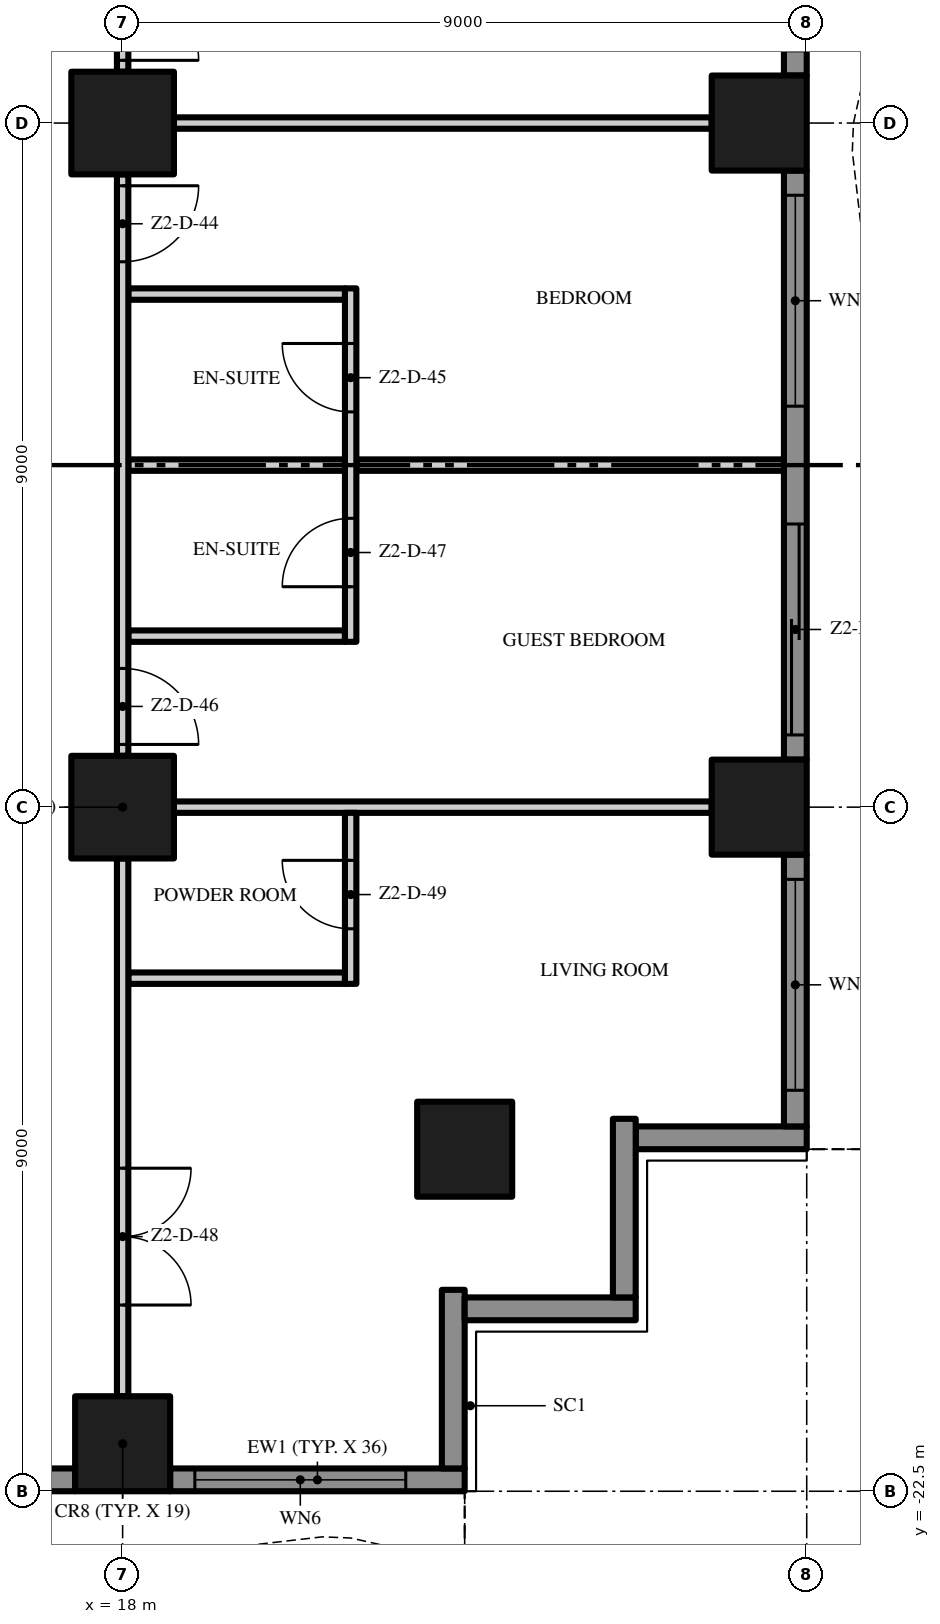
"""IFC4 building model, lengths in metres.
Left out: names, types, materials, properties, quantities, classifications, styles, units other than length and angle.
Written with IfcOpenShell. Run it as: python <this file> out.ifc"""

import sys

from ifc_helpers import new_model, si_unit, direction, frame, frame_2d, origin, origin_2d, place, context, subcontext, project, spatial, polyline, rectangle, outline, extrude, element, fill, save


model = new_model("IFC4")
c1 = context("Model", 3, precision=1e-05, world=origin(), true_north=direction((0.0, 1.0)))
c2 = subcontext(c1, "Body", "Model", "MODEL_VIEW")
j1 = project(units=[si_unit("LENGTHUNIT", "METRE"), si_unit("PLANEANGLEUNIT", "RADIAN")], contexts=[c1])
p1 = place(None, origin())
s1 = spatial("IfcSite", under=j1, at=p1, CompositionType="ELEMENT")
p2 = place(p1, origin())
s2 = spatial("IfcBuilding", under=s1, at=p2, CompositionType="ELEMENT")
p3 = place(p2, frame((0.0, 0.0, 103.6)))
s3 = spatial("IfcBuildingStorey", under=s2, at=p3, CompositionType="ELEMENT", Elevation=103.6)
p4 = place(p3, frame((18.0, -13.5, 0.0), z_axis=(0.0, 0.0, 1.0), x_axis=(1.0, 0.0, 0.0)))
e1 = element("IfcColumn", 1, at=p4, inside=s3, PredefinedType="COLUMN", context=c2, shape_type="SweptSolid", body=[
    extrude(rectangle(XDim=1.35, YDim=1.35, at=origin_2d()), origin(), (0.0, 0.0, 1.0), 3.5),
])
p5 = place(p3, frame((18.0, -21.875, 0.0), z_axis=(0.0, 0.0, 1.0), x_axis=(1.0, 0.0, 0.0)))
e2 = element("IfcColumn", 2, at=p5, inside=s3, PredefinedType="COLUMN", context=c2, shape_type="SweptSolid", body=[
    extrude(rectangle(XDim=1.25, YDim=1.25, at=origin_2d()), origin(), (0.0, 0.0, 1.0), 3.5),
])
p6 = place(p3, frame((18.0, -4.5, 0.0), z_axis=(0.0, 0.0, 1.0), x_axis=(1.0, 0.0, 0.0)))
e3 = element("IfcColumn", 3, at=p6, inside=s3, PredefinedType="COLUMN", context=c2, shape_type="SweptSolid", body=[
    extrude(rectangle(XDim=1.35, YDim=1.35, at=origin_2d()), origin(), (0.0, 0.0, 1.0), 3.5),
])
for number, where, z_axis, x_axis in (
    (4, (26.375, -13.5, 0.0), (0.0, 0.0, 1.0), (1.0, 0.0, 0.0)),
    (5, (22.5, -18.0, 0.0), (0.0, 0.0, 1.0), (1.0, 0.0, 0.0)),
    (6, (26.375, -4.5, 0.0), (0.0, 0.0, 1.0), (1.0, 0.0, 0.0)),
):
    element("IfcColumn", number, at=place(p3, frame(where, z_axis=z_axis, x_axis=x_axis)), inside=s3, PredefinedType="COLUMN", context=c2, shape_type="SweptSolid", body=[
        extrude(rectangle(XDim=1.25, YDim=1.25, at=origin_2d()), origin(), (0.0, 0.0, 1.0), 3.5),
    ])
p7 = place(p3, frame((17.375, -22.35, 0.0), z_axis=(0.0, 0.0, 1.0), x_axis=(-1.0, 0.0, 0.0)))
e7 = element("IfcWall", 7, at=p7, inside=s3, PredefinedType="SOLIDWALL", context=c2, shape_type="SweptSolid", body=[
    extrude(rectangle(XDim=7.75, YDim=0.3, at=frame_2d((3.875, 0.0))), origin(), (0.0, 0.0, 1.0), 3.5),
])
p8 = place(p7, frame((4.65, 0.0, 0.0)))
e8 = element("IfcOpeningElement", 8, at=p8, cuts=e7, PredefinedType="OPENING", context=c2, shape_type="SweptSolid", body=[
    extrude(rectangle(XDim=2.775, YDim=2.4, at=frame_2d((1.387, 1.2))), frame((0.0, 0.16, 0.0), z_axis=(0.0, -1.0, 0.0), x_axis=(1.0, 0.0, 0.0)), (0.0, 0.0, 1.0), 0.32),
])
p9 = place(p7, frame((0.325, 0.0, 0.0)))
e9 = element("IfcOpeningElement", 9, at=p9, cuts=e7, PredefinedType="OPENING", context=c2, shape_type="SweptSolid", body=[
    extrude(rectangle(XDim=2.775, YDim=2.4, at=frame_2d((1.387, 1.2))), frame((0.0, 0.16, 0.0), z_axis=(0.0, -1.0, 0.0), x_axis=(1.0, 0.0, 0.0)), (0.0, 0.0, 1.0), 0.32),
])
p10 = place(p3, frame((22.5, -22.35, 0.0), z_axis=(0.0, 0.0, 1.0), x_axis=(-1.0, 0.0, 0.0)))
e10 = element("IfcWall", 10, at=p10, inside=s3, PredefinedType="SOLIDWALL", context=c2, shape_type="SweptSolid", body=[
    extrude(rectangle(XDim=3.875, YDim=0.3, at=frame_2d((1.938, 0.0))), origin(), (0.0, 0.0, 1.0), 3.5),
])
p11 = place(p10, frame((0.775, 0.0, 0.45)))
e11 = element("IfcOpeningElement", 11, at=p11, cuts=e10, PredefinedType="OPENING", context=c2, shape_type="SweptSolid", body=[
    extrude(rectangle(XDim=2.775, YDim=2.65, at=frame_2d((1.387, 1.325))), frame((0.0, 0.16, 0.0), z_axis=(0.0, -1.0, 0.0), x_axis=(1.0, 0.0, 0.0)), (0.0, 0.0, 1.0), 0.32),
])
p12 = place(p3, frame((22.35, -19.85, 0.0), z_axis=(0.0, 0.0, 1.0), x_axis=(0.0, -1.0, 0.0)))
e12 = element("IfcWall", 12, at=p12, inside=s3, PredefinedType="SOLIDWALL", context=c2, shape_type="SweptSolid", body=[
    extrude(rectangle(XDim=2.35, YDim=0.3, at=frame_2d((1.175, 0.0))), origin(), (0.0, 0.0, 1.0), 3.5),
])
p13 = place(p3, frame((24.75, -20.1, 0.0), z_axis=(0.0, 0.0, 1.0), x_axis=(-1.0, 0.0, 0.0)))
e13 = element("IfcWall", 13, at=p13, inside=s3, PredefinedType="SOLIDWALL", context=c2, shape_type="SweptSolid", body=[
    extrude(rectangle(XDim=2.25, YDim=0.3, at=frame_2d((1.125, 0.0))), origin(), (0.0, 0.0, 1.0), 3.5),
])
p14 = place(p3, frame((24.6, -17.6, 0.0), z_axis=(0.0, 0.0, 1.0), x_axis=(0.0, -1.0, 0.0)))
e14 = element("IfcWall", 14, at=p14, inside=s3, PredefinedType="SOLIDWALL", context=c2, shape_type="SweptSolid", body=[
    extrude(rectangle(XDim=2.35, YDim=0.3, at=frame_2d((1.175, 0.0))), origin(), (0.0, 0.0, 1.0), 3.5),
])
p15 = place(p3, frame((27.0, -17.85, 0.0), z_axis=(0.0, 0.0, 1.0), x_axis=(-1.0, 0.0, 0.0)))
e15 = element("IfcWall", 15, at=p15, inside=s3, PredefinedType="SOLIDWALL", context=c2, shape_type="SweptSolid", body=[
    extrude(rectangle(XDim=2.25, YDim=0.3, at=frame_2d((1.125, 0.0))), origin(), (0.0, 0.0, 1.0), 3.5),
])
p16 = place(p3, frame((26.85, -14.125, 0.0), z_axis=(0.0, 0.0, 1.0), x_axis=(0.0, -1.0, 0.0)))
e16 = element("IfcWall", 16, at=p16, inside=s3, PredefinedType="SOLIDWALL", context=c2, shape_type="SweptSolid", body=[
    extrude(rectangle(XDim=3.575, YDim=0.3, at=frame_2d((1.788, 0.0))), origin(), (0.0, 0.0, 1.0), 3.5),
])
p17 = place(p16, frame((0.325, 0.0, 0.45)))
e17 = element("IfcOpeningElement", 17, at=p17, cuts=e16, PredefinedType="OPENING", context=c2, shape_type="SweptSolid", body=[
    extrude(rectangle(XDim=2.775, YDim=2.65, at=frame_2d((1.387, 1.325))), frame((0.0, 0.16, 0.0), z_axis=(0.0, -1.0, 0.0), x_axis=(1.0, 0.0, 0.0)), (0.0, 0.0, 1.0), 0.32),
])
p18 = place(p3, frame((26.85, -5.125, 0.0), z_axis=(0.0, 0.0, 1.0), x_axis=(0.0, -1.0, 0.0)))
e18 = element("IfcWall", 18, at=p18, inside=s3, PredefinedType="SOLIDWALL", context=c2, shape_type="SweptSolid", body=[
    extrude(rectangle(XDim=7.75, YDim=0.3, at=frame_2d((3.875, 0.0))), origin(), (0.0, 0.0, 1.0), 3.5),
])
p19 = place(p18, frame((4.65, 0.0, 0.0)))
e19 = element("IfcOpeningElement", 19, at=p19, cuts=e18, PredefinedType="OPENING", context=c2, shape_type="SweptSolid", body=[
    extrude(rectangle(XDim=2.775, YDim=2.4, at=frame_2d((1.387, 1.2))), frame((0.0, 0.16, 0.0), z_axis=(0.0, -1.0, 0.0), x_axis=(1.0, 0.0, 0.0)), (0.0, 0.0, 1.0), 0.32),
])
p20 = place(p18, frame((0.325, 0.0, 0.45)))
e20 = element("IfcOpeningElement", 20, at=p20, cuts=e18, PredefinedType="OPENING", context=c2, shape_type="SweptSolid", body=[
    extrude(rectangle(XDim=2.775, YDim=2.65, at=frame_2d((1.387, 1.325))), frame((0.0, 0.16, 0.0), z_axis=(0.0, -1.0, 0.0), x_axis=(1.0, 0.0, 0.0)), (0.0, 0.0, 1.0), 0.32),
])
p21 = place(p3, frame((26.85, 3.875, 0.0), z_axis=(0.0, 0.0, 1.0), x_axis=(0.0, -1.0, 0.0)))
e21 = element("IfcWall", 21, at=p21, inside=s3, PredefinedType="SOLIDWALL", context=c2, shape_type="SweptSolid", body=[
    extrude(rectangle(XDim=7.75, YDim=0.3, at=frame_2d((3.875, 0.0))), origin(), (0.0, 0.0, 1.0), 3.5),
])
p22 = place(p21, frame((4.65, 0.0, 0.45)))
e22 = element("IfcOpeningElement", 22, at=p22, cuts=e21, PredefinedType="OPENING", context=c2, shape_type="SweptSolid", body=[
    extrude(rectangle(XDim=2.775, YDim=2.65, at=frame_2d((1.387, 1.325))), frame((0.0, 0.16, 0.0), z_axis=(0.0, -1.0, 0.0), x_axis=(1.0, 0.0, 0.0)), (0.0, 0.0, 1.0), 0.32),
])
p23 = place(p21, frame((0.325, 0.0, 0.0)))
e23 = element("IfcOpeningElement", 23, at=p23, cuts=e21, PredefinedType="OPENING", context=c2, shape_type="SweptSolid", body=[
    extrude(rectangle(XDim=2.775, YDim=2.4, at=frame_2d((1.387, 1.2))), frame((0.0, 0.16, 0.0), z_axis=(0.0, -1.0, 0.0), x_axis=(1.0, 0.0, 0.0)), (0.0, 0.0, 1.0), 0.32),
])
p24 = place(p3, origin())
e24 = element("IfcWall", 24, at=p24, inside=s3, PredefinedType="USERDEFINED", context=c2, shape_type="SweptSolid", body=[
    extrude(outline(polyline([(-22.5, -23.451), (-21.0, -24.112), (-19.5, -24.845), (-18.0, -25.369), (-16.875, -25.5), (-16.5, -25.485), (-15.0, -25.149), (-13.5, -24.488), (-12.0, -23.755), (-10.5, -23.231), (-9.375, -23.1), (-9.0, -23.115), (-7.5, -23.451), (-6.0, -24.112), (-4.5, -24.845), (-3.0, -25.369), (-1.875, -25.5), (-1.5, -25.485), (0.0, -25.149), (1.5, -24.488), (3.0, -23.755), (4.5, -23.231), (5.625, -23.1), (6.0, -23.115), (7.5, -23.451), (9.0, -24.112), (10.5, -24.845), (12.0, -25.369), (13.125, -25.5), (13.5, -25.485), (15.0, -25.149), (16.5, -24.488), (18.0, -23.755), (19.5, -23.231), (20.625, -23.1), (21.0, -23.115), (22.5, -23.451), (22.555, -23.208), (21.033, -22.866), (20.615, -22.849), (19.444, -22.986), (17.904, -23.524), (16.395, -24.261), (14.921, -24.91), (13.467, -25.236), (13.135, -25.249), (12.056, -25.124), (10.596, -24.614), (9.105, -23.885), (7.579, -23.213), (6.033, -22.866), (5.615, -22.849), (4.444, -22.986), (2.904, -23.524), (1.395, -24.261), (-0.079, -24.91), (-1.533, -25.236), (-1.865, -25.249), (-2.944, -25.124), (-4.404, -24.614), (-5.895, -23.885), (-7.421, -23.213), (-8.967, -22.866), (-9.385, -22.849), (-10.556, -22.986), (-12.096, -23.524), (-13.605, -24.261), (-15.079, -24.91), (-16.533, -25.236), (-16.865, -25.249), (-17.944, -25.124), (-19.404, -24.614), (-20.895, -23.885), (-22.399, -23.223), (-22.5, -23.451)])), origin(), (0.0, 0.0, 1.0), 0.9),
])
p25 = place(p3, origin())
e25 = element("IfcWall", 25, at=p25, inside=s3, PredefinedType="USERDEFINED", context=c2, shape_type="SweptSolid", body=[
    extrude(outline(polyline([(27.951, -18.0), (28.612, -16.5), (29.345, -15.0), (29.869, -13.5), (30.0, -12.375), (29.985, -12.0), (29.649, -10.5), (28.988, -9.0), (28.255, -7.5), (27.731, -6.0), (27.6, -4.875), (27.615, -4.5), (27.951, -3.0), (28.612, -1.5), (29.345, 0.0), (29.869, 1.5), (30.0, 2.625), (29.985, 3.0), (29.649, 4.5), (28.988, 6.0), (28.255, 7.5), (27.731, 9.0), (27.6, 10.125), (27.615, 10.5), (27.951, 12.0), (28.612, 13.5), (29.345, 15.0), (29.869, 16.5), (30.0, 17.625), (29.985, 18.0), (29.735, 17.99), (29.749, 17.635), (29.624, 16.556), (29.114, 15.096), (28.385, 13.605), (27.713, 12.079), (27.366, 10.533), (27.349, 10.115), (27.486, 8.944), (28.024, 7.404), (28.761, 5.895), (29.41, 4.421), (29.736, 2.967), (29.749, 2.635), (29.624, 1.556), (29.114, 0.096), (28.385, -1.395), (27.713, -2.921), (27.366, -4.467), (27.349, -4.885), (27.486, -6.056), (28.024, -7.596), (28.761, -9.105), (29.41, -10.579), (29.736, -12.033), (29.749, -12.365), (29.624, -13.444), (29.114, -14.904), (28.385, -16.395), (27.723, -17.899), (27.951, -18.0)])), origin(), (0.0, 0.0, 1.0), 0.9),
])
p26 = place(p3, frame((18.075, -15.75, 0.0), z_axis=(0.0, 0.0, 1.0), x_axis=(1.0, 0.0, 0.0)))
e26 = element("IfcWall", 26, at=p26, inside=s3, PredefinedType="PARTITIONING", context=c2, shape_type="SweptSolid", body=[
    extrude(rectangle(XDim=2.85, YDim=0.15, at=frame_2d((1.425, 0.0))), origin(), (0.0, 0.0, 1.0), 3.5),
])
p27 = place(p3, frame((18.675, -13.5, 0.0), z_axis=(0.0, 0.0, 1.0), x_axis=(1.0, 0.0, 0.0)))
e27 = element("IfcWall", 27, at=p27, inside=s3, PredefinedType="PARTITIONING", context=c2, shape_type="SweptSolid", body=[
    extrude(rectangle(XDim=7.075, YDim=0.15, at=frame_2d((3.538, 0.0))), origin(), (0.0, 0.0, 1.0), 3.5),
])
for number, where, z_axis, x_axis in (
    (28, (18.075, -11.25, 0.0), (0.0, 0.0, 1.0), (1.0, 0.0, 0.0)),
    (29, (18.075, -9.0, 0.0), (0.0, 0.0, 1.0), (1.0, 0.0, 0.0)),
):
    element("IfcWall", number, at=place(p3, frame(where, z_axis=z_axis, x_axis=x_axis)), inside=s3, PredefinedType="PARTITIONING", context=c2, shape_type="SweptSolid", body=[
        extrude(rectangle(XDim=2.85, YDim=0.15, at=frame_2d((1.425, 0.0))), origin(), (0.0, 0.0, 1.0), 3.5),
    ])
p28 = place(p3, frame((21.075, -9.0, 0.0), z_axis=(0.0, 0.0, 1.0), x_axis=(1.0, 0.0, 0.0)))
e30 = element("IfcWall", 30, at=p28, inside=s3, PredefinedType="PARTITIONING", context=c2, shape_type="SweptSolid", body=[
    extrude(rectangle(XDim=5.625, YDim=0.15, at=frame_2d((2.812, 0.0))), origin(), (0.0, 0.0, 1.0), 3.5),
])
p29 = place(p3, frame((18.075, -6.75, 0.0), z_axis=(0.0, 0.0, 1.0), x_axis=(1.0, 0.0, 0.0)))
e31 = element("IfcWall", 31, at=p29, inside=s3, PredefinedType="PARTITIONING", context=c2, shape_type="SweptSolid", body=[
    extrude(rectangle(XDim=2.85, YDim=0.15, at=frame_2d((1.425, 0.0))), origin(), (0.0, 0.0, 1.0), 3.5),
])
p30 = place(p3, frame((18.675, -4.5, 0.0), z_axis=(0.0, 0.0, 1.0), x_axis=(1.0, 0.0, 0.0)))
e32 = element("IfcWall", 32, at=p30, inside=s3, PredefinedType="PARTITIONING", context=c2, shape_type="SweptSolid", body=[
    extrude(rectangle(XDim=7.075, YDim=0.15, at=frame_2d((3.538, 0.0))), origin(), (0.0, 0.0, 1.0), 3.5),
])
p31 = place(p3, frame((18.0, -14.175, 0.0), z_axis=(0.0, 0.0, 1.0), x_axis=(0.0, -1.0, 0.0)))
e33 = element("IfcWall", 33, at=p31, inside=s3, PredefinedType="PARTITIONING", context=c2, shape_type="SweptSolid", body=[
    extrude(rectangle(XDim=7.075, YDim=0.15, at=frame_2d((3.538, 0.0))), origin(), (0.0, 0.0, 1.0), 3.5),
])
p32 = place(p31, frame((4.075, 0.0, 0.0)))
e34 = element("IfcOpeningElement", 34, at=p32, cuts=e33, PredefinedType="OPENING", context=c2, shape_type="SweptSolid", body=[
    extrude(rectangle(XDim=1.8, YDim=2.4, at=frame_2d((0.9, 1.2))), frame((0.0, 0.085, 0.0), z_axis=(0.0, -1.0, 0.0), x_axis=(1.0, 0.0, 0.0)), (0.0, 0.0, 1.0), 0.17),
])
p33 = place(p3, frame((18.0, -5.175, 0.0), z_axis=(0.0, 0.0, 1.0), x_axis=(0.0, -1.0, 0.0)))
e35 = element("IfcWall", 35, at=p33, inside=s3, PredefinedType="PARTITIONING", context=c2, shape_type="SweptSolid", body=[
    extrude(rectangle(XDim=7.65, YDim=0.15, at=frame_2d((3.825, 0.0))), origin(), (0.0, 0.0, 1.0), 3.5),
])
p34 = place(p33, frame((0.15, 0.0, 0.0)))
e36 = element("IfcOpeningElement", 36, at=p34, cuts=e35, PredefinedType="OPENING", context=c2, shape_type="SweptSolid", body=[
    extrude(rectangle(XDim=1.0, YDim=2.4, at=frame_2d((0.5, 1.2))), frame((0.0, 0.085, 0.0), z_axis=(0.0, -1.0, 0.0), x_axis=(1.0, 0.0, 0.0)), (0.0, 0.0, 1.0), 0.17),
])
p35 = place(p33, frame((6.5, 0.0, 0.0)))
e37 = element("IfcOpeningElement", 37, at=p35, cuts=e35, PredefinedType="OPENING", context=c2, shape_type="SweptSolid", body=[
    extrude(rectangle(XDim=1.0, YDim=2.4, at=frame_2d((0.5, 1.2))), frame((0.0, 0.085, 0.0), z_axis=(0.0, -1.0, 0.0), x_axis=(1.0, 0.0, 0.0)), (0.0, 0.0, 1.0), 0.17),
])
p36 = place(p3, frame((18.0, -0.1, 0.0), z_axis=(0.0, 0.0, 1.0), x_axis=(0.0, -1.0, 0.0)))
e38 = element("IfcWall", 38, at=p36, inside=s3, PredefinedType="PARTITIONING", context=c2, shape_type="SweptSolid", body=[
    extrude(rectangle(XDim=3.725, YDim=0.15, at=frame_2d((1.863, 0.0))), origin(), (0.0, 0.0, 1.0), 3.5),
])
p37 = place(p36, frame((2.575, 0.0, 0.0)))
e39 = element("IfcOpeningElement", 39, at=p37, cuts=e38, PredefinedType="OPENING", context=c2, shape_type="SweptSolid", body=[
    extrude(rectangle(XDim=1.0, YDim=2.4, at=frame_2d((0.5, 1.2))), frame((0.0, 0.085, 0.0), z_axis=(0.0, -1.0, 0.0), x_axis=(1.0, 0.0, 0.0)), (0.0, 0.0, 1.0), 0.17),
])
p38 = place(p3, frame((21.0, -15.825, 0.0), z_axis=(0.0, 0.0, 1.0), x_axis=(0.0, 1.0, 0.0)))
e40 = element("IfcWall", 40, at=p38, inside=s3, PredefinedType="PARTITIONING", context=c2, shape_type="SweptSolid", body=[
    extrude(rectangle(XDim=2.25, YDim=0.15, at=frame_2d((1.125, 0.0))), origin(), (0.0, 0.0, 1.0), 3.5),
])
p39 = place(p38, frame((0.725, 0.0, 0.0)))
e41 = element("IfcOpeningElement", 41, at=p39, cuts=e40, PredefinedType="OPENING", context=c2, shape_type="SweptSolid", body=[
    extrude(rectangle(XDim=0.9, YDim=2.1, at=frame_2d((0.45, 1.05))), frame((0.0, 0.085, 0.0), z_axis=(0.0, -1.0, 0.0), x_axis=(1.0, 0.0, 0.0)), (0.0, 0.0, 1.0), 0.17),
])
p40 = place(p3, frame((21.0, -11.325, 0.0), z_axis=(0.0, 0.0, 1.0), x_axis=(0.0, 1.0, 0.0)))
e42 = element("IfcWall", 42, at=p40, inside=s3, PredefinedType="PARTITIONING", context=c2, shape_type="SweptSolid", body=[
    extrude(rectangle(XDim=4.65, YDim=0.15, at=frame_2d((2.325, 0.0))), origin(), (0.0, 0.0, 1.0), 3.5),
])
p41 = place(p40, frame((3.025, 0.0, 0.0)))
e43 = element("IfcOpeningElement", 43, at=p41, cuts=e42, PredefinedType="OPENING", context=c2, shape_type="SweptSolid", body=[
    extrude(rectangle(XDim=0.9, YDim=2.1, at=frame_2d((0.45, 1.05))), frame((0.0, 0.085, 0.0), z_axis=(0.0, -1.0, 0.0), x_axis=(1.0, 0.0, 0.0)), (0.0, 0.0, 1.0), 0.17),
])
p42 = place(p40, frame((0.725, 0.0, 0.0)))
e44 = element("IfcOpeningElement", 44, at=p42, cuts=e42, PredefinedType="OPENING", context=c2, shape_type="SweptSolid", body=[
    extrude(rectangle(XDim=0.9, YDim=2.1, at=frame_2d((0.45, 1.05))), frame((0.0, 0.085, 0.0), z_axis=(0.0, -1.0, 0.0), x_axis=(1.0, 0.0, 0.0)), (0.0, 0.0, 1.0), 0.17),
])
p43 = place(p11, origin())
e45 = element("IfcWindow", 45, at=p43, inside=s3, PartitioningType="SINGLE_PANEL", PredefinedType="WINDOW", context=c2, shape_type="SweptSolid", body=[
    extrude(rectangle(XDim=2.775, YDim=2.65, at=frame_2d((1.387, 1.325))), frame((0.0, 0.03, 0.0), z_axis=(0.0, -1.0, 0.0), x_axis=(1.0, 0.0, 0.0)), (0.0, 0.0, 1.0), 0.06),
])
fill(e11, e45)
p44 = place(p17, origin())
e46 = element("IfcWindow", 46, at=p44, inside=s3, PartitioningType="SINGLE_PANEL", PredefinedType="WINDOW", context=c2, shape_type="SweptSolid", body=[
    extrude(rectangle(XDim=2.775, YDim=2.65, at=frame_2d((1.387, 1.325))), frame((0.0, 0.03, 0.0), z_axis=(0.0, -1.0, 0.0), x_axis=(1.0, 0.0, 0.0)), (0.0, 0.0, 1.0), 0.06),
])
fill(e17, e46)
p45 = place(p19, origin())
e47 = element("IfcDoor", 47, at=p45, inside=s3, OperationType="SINGLE_SWING_LEFT", PredefinedType="DOOR", context=c2, shape_type="SweptSolid", body=[
    extrude(rectangle(XDim=2.775, YDim=2.4, at=frame_2d((1.387, 1.2))), frame((0.0, 0.025, 0.0), z_axis=(0.0, -1.0, 0.0), x_axis=(1.0, 0.0, 0.0)), (0.0, 0.0, 1.0), 0.05),
])
fill(e19, e47)
p46 = place(p20, origin())
e48 = element("IfcWindow", 48, at=p46, inside=s3, PartitioningType="SINGLE_PANEL", PredefinedType="WINDOW", context=c2, shape_type="SweptSolid", body=[
    extrude(rectangle(XDim=2.775, YDim=2.65, at=frame_2d((1.387, 1.325))), frame((0.0, 0.03, 0.0), z_axis=(0.0, -1.0, 0.0), x_axis=(1.0, 0.0, 0.0)), (0.0, 0.0, 1.0), 0.06),
])
fill(e20, e48)
p47 = place(p37, origin())
e49 = element("IfcDoor", 49, at=p47, inside=s3, OperationType="SINGLE_SWING_RIGHT", PredefinedType="DOOR", context=c2, shape_type="SweptSolid", body=[
    extrude(rectangle(XDim=1.0, YDim=2.4, at=frame_2d((0.5, 1.2))), frame((0.0, 0.025, 0.0), z_axis=(0.0, -1.0, 0.0), x_axis=(1.0, 0.0, 0.0)), (0.0, 0.0, 1.0), 0.05),
])
fill(e39, e49)
p48 = place(p34, origin())
e50 = element("IfcDoor", 50, at=p48, inside=s3, OperationType="SINGLE_SWING_LEFT", PredefinedType="DOOR", context=c2, shape_type="SweptSolid", body=[
    extrude(rectangle(XDim=1.0, YDim=2.4, at=frame_2d((0.5, 1.2))), frame((0.0, 0.025, 0.0), z_axis=(0.0, -1.0, 0.0), x_axis=(1.0, 0.0, 0.0)), (0.0, 0.0, 1.0), 0.05),
])
fill(e36, e50)
p49 = place(p41, origin())
e51 = element("IfcDoor", 51, at=p49, inside=s3, OperationType="SINGLE_SWING_RIGHT", PredefinedType="DOOR", context=c2, shape_type="SweptSolid", body=[
    extrude(rectangle(XDim=0.9, YDim=2.1, at=frame_2d((0.45, 1.05))), frame((0.0, 0.025, 0.0), z_axis=(0.0, -1.0, 0.0), x_axis=(1.0, 0.0, 0.0)), (0.0, 0.0, 1.0), 0.05),
])
fill(e43, e51)
p50 = place(p35, origin())
e52 = element("IfcDoor", 52, at=p50, inside=s3, OperationType="SINGLE_SWING_RIGHT", PredefinedType="DOOR", context=c2, shape_type="SweptSolid", body=[
    extrude(rectangle(XDim=1.0, YDim=2.4, at=frame_2d((0.5, 1.2))), frame((0.0, 0.025, 0.0), z_axis=(0.0, -1.0, 0.0), x_axis=(1.0, 0.0, 0.0)), (0.0, 0.0, 1.0), 0.05),
])
fill(e37, e52)
p51 = place(p42, origin())
e53 = element("IfcDoor", 53, at=p51, inside=s3, OperationType="SINGLE_SWING_LEFT", PredefinedType="DOOR", context=c2, shape_type="SweptSolid", body=[
    extrude(rectangle(XDim=0.9, YDim=2.1, at=frame_2d((0.45, 1.05))), frame((0.0, 0.025, 0.0), z_axis=(0.0, -1.0, 0.0), x_axis=(1.0, 0.0, 0.0)), (0.0, 0.0, 1.0), 0.05),
])
fill(e44, e53)
p52 = place(p32, origin())
e54 = element("IfcDoor", 54, at=p52, inside=s3, OperationType="DOUBLE_DOOR_SINGLE_SWING", PredefinedType="DOOR", context=c2, shape_type="SweptSolid", body=[
    extrude(rectangle(XDim=1.8, YDim=2.4, at=frame_2d((0.9, 1.2))), frame((0.0, 0.025, 0.0), z_axis=(0.0, -1.0, 0.0), x_axis=(1.0, 0.0, 0.0)), (0.0, 0.0, 1.0), 0.05),
])
fill(e34, e54)
p53 = place(p39, origin())
e55 = element("IfcDoor", 55, at=p53, inside=s3, OperationType="SINGLE_SWING_RIGHT", PredefinedType="DOOR", context=c2, shape_type="SweptSolid", body=[
    extrude(rectangle(XDim=0.9, YDim=2.1, at=frame_2d((0.45, 1.05))), frame((0.0, 0.025, 0.0), z_axis=(0.0, -1.0, 0.0), x_axis=(1.0, 0.0, 0.0)), (0.0, 0.0, 1.0), 0.05),
])
fill(e41, e55)
save(model, sys.argv[1])
